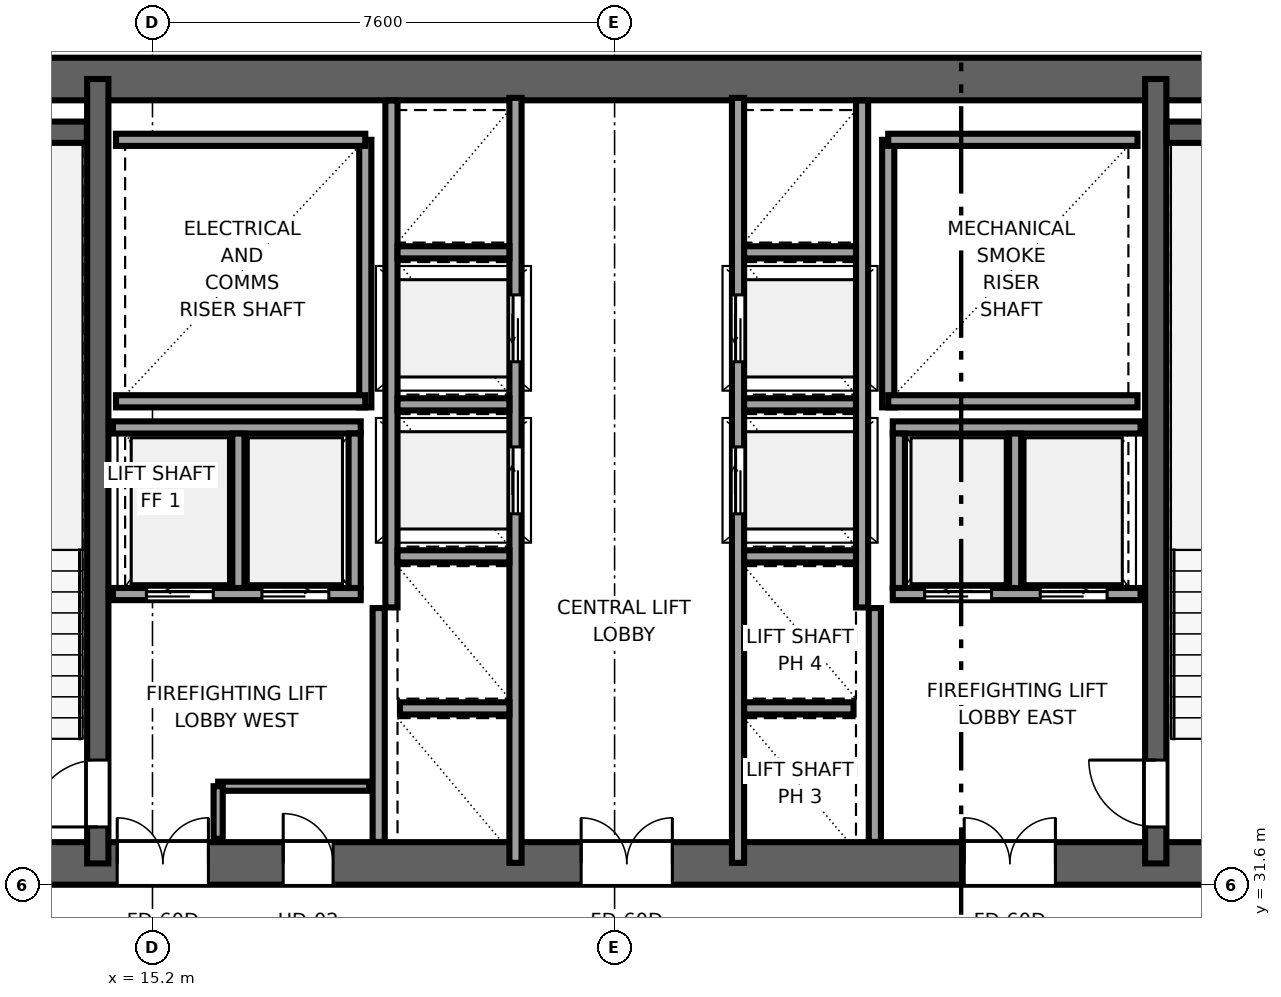
"""IFC4 building model, lengths in metres.
Left out: names, types, materials, properties, quantities, classifications, styles, units other than length and angle.
Written with IfcOpenShell. Run it as: python <this file> out.ifc"""

import sys

from ifc_helpers import new_model, si_unit, direction, frame, frame_2d, origin, place, context, subcontext, project, spatial, rectangle, extrude, source, transform, mapped, element, fill, save


model = new_model("IFC4")
c1 = context("Model", 3, precision=1e-05, world=origin(), true_north=direction((0.0, 1.0)))
c2 = subcontext(c1, "Body", "Model", "MODEL_VIEW")
j1 = project(units=[si_unit("LENGTHUNIT", "METRE"), si_unit("PLANEANGLEUNIT", "RADIAN")], contexts=[c1])
p1 = place(None, origin())
s1 = spatial("IfcSite", under=j1, at=p1, CompositionType="ELEMENT")
p2 = place(p1, origin())
s2 = spatial("IfcBuilding", under=s1, at=p2, CompositionType="ELEMENT")
p3 = place(p2, frame((0.0, 0.0, 111.55)))
s3 = spatial("IfcBuildingStorey", under=s2, at=p3, CompositionType="ELEMENT", Elevation=111.55)
p4 = place(p3, frame((9.8, 31.95, 0.0), z_axis=(0.0, 0.0, 1.0), x_axis=(1.0, 0.0, 0.0)))
e1 = element("IfcWall", 1, at=p4, inside=s3, PredefinedType="SHEAR", context=c2, shape_type="SweptSolid", body=[
    extrude(rectangle(XDim=26.4, YDim=0.7, at=frame_2d((13.2, 0.0))), origin(), (0.0, 0.0, 1.0), 3.55),
])
p5 = place(p4, frame((6.32, 0.0, 0.0), z_axis=(0.0, 0.0, 1.0), x_axis=(-1.0, 0.0, 0.0)))
e2 = element("IfcOpeningElement", 2, at=p5, cuts=e1, PredefinedType="OPENING", context=c2, shape_type="SweptSolid", body=[
    extrude(rectangle(XDim=1.5, YDim=2.04, at=frame_2d((0.75, 1.02))), frame((0.0, 0.36, 0.0), z_axis=(0.0, -1.0, 0.0), x_axis=(1.0, 0.0, 0.0)), (0.0, 0.0, 1.0), 0.72),
])
p6 = place(p4, frame((13.95, 0.0, 0.0), z_axis=(0.0, 0.0, 1.0), x_axis=(-1.0, 0.0, 0.0)))
e3 = element("IfcOpeningElement", 3, at=p6, cuts=e1, PredefinedType="OPENING", context=c2, shape_type="SweptSolid", body=[
    extrude(rectangle(XDim=1.5, YDim=2.04, at=frame_2d((0.75, 1.02))), frame((0.0, 0.36, 0.0), z_axis=(0.0, -1.0, 0.0), x_axis=(1.0, 0.0, 0.0)), (0.0, 0.0, 1.0), 0.72),
])
p7 = place(p4, frame((20.25, 0.0, 0.0), z_axis=(0.0, 0.0, 1.0), x_axis=(-1.0, 0.0, 0.0)))
e4 = element("IfcOpeningElement", 4, at=p7, cuts=e1, PredefinedType="OPENING", context=c2, shape_type="SweptSolid", body=[
    extrude(rectangle(XDim=1.5, YDim=2.04, at=frame_2d((0.75, 1.02))), frame((0.0, 0.36, 0.0), z_axis=(0.0, -1.0, 0.0), x_axis=(1.0, 0.0, 0.0)), (0.0, 0.0, 1.0), 0.72),
])
p8 = place(p4, frame((8.37, 0.0, 0.0), z_axis=(0.0, 0.0, 1.0), x_axis=(-1.0, 0.0, 0.0)))
e5 = element("IfcOpeningElement", 5, at=p8, cuts=e1, PredefinedType="OPENING", context=c2, shape_type="SweptSolid", body=[
    extrude(rectangle(XDim=0.82, YDim=2.01, at=frame_2d((0.41, 1.005))), frame((0.0, 0.36, 0.0), z_axis=(0.0, -1.0, 0.0), x_axis=(1.0, 0.0, 0.0)), (0.0, 0.0, 1.0), 0.72),
])
p9 = place(p3, frame((9.8, 44.85, 0.0), z_axis=(0.0, 0.0, 1.0), x_axis=(1.0, 0.0, 0.0)))
e6 = element("IfcWall", 6, at=p9, inside=s3, PredefinedType="SHEAR", context=c2, shape_type="SweptSolid", body=[
    extrude(rectangle(XDim=26.4, YDim=0.7, at=frame_2d((13.2, 0.0))), origin(), (0.0, 0.0, 1.0), 3.55),
])
p10 = place(p3, frame((14.3, 31.95, 0.0), z_axis=(0.0, 0.0, 1.0), x_axis=(0.0, 1.0, 0.0)))
e7 = element("IfcWall", 7, at=p10, inside=s3, PredefinedType="SHEAR", context=c2, shape_type="SweptSolid", body=[
    extrude(rectangle(XDim=12.9, YDim=0.35, at=frame_2d((6.45, 0.0))), origin(), (0.0, 0.0, 1.0), 3.55),
])
p11 = place(p10, frame((0.6, 0.0, 0.0)))
e8 = element("IfcOpeningElement", 8, at=p11, cuts=e7, PredefinedType="OPENING", context=c2, shape_type="SweptSolid", body=[
    extrude(rectangle(XDim=1.1, YDim=2.12, at=frame_2d((0.55, 1.06))), frame((0.0, 0.185, 0.0), z_axis=(0.0, -1.0, 0.0), x_axis=(1.0, 0.0, 0.0)), (0.0, 0.0, 1.0), 0.37),
])
p12 = place(p3, frame((31.7, 31.95, 0.0), z_axis=(0.0, 0.0, 1.0), x_axis=(0.0, 1.0, 0.0)))
e9 = element("IfcWall", 9, at=p12, inside=s3, PredefinedType="SHEAR", context=c2, shape_type="SweptSolid", body=[
    extrude(rectangle(XDim=12.9, YDim=0.35, at=frame_2d((6.45, 0.0))), origin(), (0.0, 0.0, 1.0), 3.55),
])
p13 = place(p12, frame((1.7, 0.0, 0.0), z_axis=(0.0, 0.0, 1.0), x_axis=(-1.0, 0.0, 0.0)))
e10 = element("IfcOpeningElement", 10, at=p13, cuts=e9, PredefinedType="OPENING", context=c2, shape_type="SweptSolid", body=[
    extrude(rectangle(XDim=1.1, YDim=2.12, at=frame_2d((0.55, 1.06))), frame((0.0, 0.185, 0.0), z_axis=(0.0, -1.0, 0.0), x_axis=(1.0, 0.0, 0.0)), (0.0, 0.0, 1.0), 0.37),
])
for number, where, z_axis, x_axis in (
    (11, (10.52, 43.975, 0.0), (0.0, 0.0, 1.0), (1.0, 0.0, 0.0)),
    (12, (31.88, 43.975, 0.0), (0.0, 0.0, 1.0), (1.0, 0.0, 0.0)),
):
    element("IfcWall", number, at=place(p3, frame(where, z_axis=z_axis, x_axis=x_axis)), inside=s3, PredefinedType="SHEAR", context=c2, shape_type="SweptSolid", body=[
        extrude(rectangle(XDim=3.6, YDim=0.35, at=frame_2d((1.8, 0.0))), origin(), (0.0, 0.0, 1.0), 3.55),
    ])
p14 = place(p3, frame((18.7, 39.45, 0.0), z_axis=(0.0, 0.0, 1.0), x_axis=(0.0, 1.0, 0.0)))
e13 = element("IfcWall", 13, at=p14, inside=s3, PredefinedType="SOLIDWALL", context=c2, shape_type="SweptSolid", body=[
    extrude(rectangle(XDim=4.4, YDim=0.2, at=frame_2d((2.2, 0.0))), origin(), (0.0, 0.0, 1.0), 3.37),
])
for number, where, z_axis, x_axis in (
    (14, (14.6, 39.55, 0.0), (0.0, 0.0, 1.0), (1.0, 0.0, 0.0)),
    (15, (14.6, 43.85, 0.0), (0.0, 0.0, 1.0), (1.0, 0.0, 0.0)),
):
    element("IfcWall", number, at=place(p3, frame(where, z_axis=z_axis, x_axis=x_axis)), inside=s3, PredefinedType="SOLIDWALL", context=c2, shape_type="SweptSolid", body=[
        extrude(rectangle(XDim=4.1, YDim=0.2, at=frame_2d((2.05, 0.0))), origin(), (0.0, 0.0, 1.0), 3.37),
    ])
p15 = place(p3, frame((27.3, 39.45, 0.0), z_axis=(0.0, 0.0, 1.0), x_axis=(0.0, 1.0, 0.0)))
e16 = element("IfcWall", 16, at=p15, inside=s3, PredefinedType="SOLIDWALL", context=c2, shape_type="SweptSolid", body=[
    extrude(rectangle(XDim=4.4, YDim=0.2, at=frame_2d((2.2, 0.0))), origin(), (0.0, 0.0, 1.0), 3.37),
])
for number, where, z_axis, x_axis in (
    (17, (27.3, 39.55, 0.0), (0.0, 0.0, 1.0), (1.0, 0.0, 0.0)),
    (18, (27.3, 43.85, 0.0), (0.0, 0.0, 1.0), (1.0, 0.0, 0.0)),
):
    element("IfcWall", number, at=place(p3, frame(where, z_axis=z_axis, x_axis=x_axis)), inside=s3, PredefinedType="SOLIDWALL", context=c2, shape_type="SweptSolid", body=[
        extrude(rectangle(XDim=4.1, YDim=0.2, at=frame_2d((2.05, 0.0))), origin(), (0.0, 0.0, 1.0), 3.37),
    ])
for number, where, z_axis, x_axis in (
    (19, (18.92, 32.304, 0.0), (0.0, 0.0, 1.0), (0.0, 1.0, 0.0)),
    (20, (27.08, 32.304, 0.0), (0.0, 0.0, 1.0), (0.0, 1.0, 0.0)),
):
    element("IfcWall", number, at=place(p3, frame(where, z_axis=z_axis, x_axis=x_axis)), inside=s3, PredefinedType="SOLIDWALL", context=c2, shape_type="SweptSolid", body=[
        extrude(rectangle(XDim=3.846, YDim=0.2, at=frame_2d((1.923, 0.0))), origin(), (0.0, 0.0, 1.0), 3.37),
    ])
p16 = place(p3, frame((21.17, 31.96, 0.0), z_axis=(0.0, 0.0, 1.0), x_axis=(0.0, 1.0, 0.0)))
e21 = element("IfcWall", 21, at=p16, inside=s3, PredefinedType="SOLIDWALL", context=c2, shape_type="SweptSolid", body=[
    extrude(rectangle(XDim=12.58, YDim=0.2, at=frame_2d((6.29, 0.0))), origin(), (0.0, 0.0, 1.0), 3.37),
])
p17 = place(p16, frame((5.74, 0.0, 0.0)))
e22 = element("IfcOpeningElement", 22, at=p17, cuts=e21, PredefinedType="OPENING", context=c2, shape_type="SweptSolid", body=[
    extrude(rectangle(XDim=1.1, YDim=2.12, at=frame_2d((0.55, 1.06))), frame((0.0, 0.11, 0.0), z_axis=(0.0, -1.0, 0.0), x_axis=(1.0, 0.0, 0.0)), (0.0, 0.0, 1.0), 0.22),
])
p18 = place(p16, frame((8.24, 0.0, 0.0)))
e23 = element("IfcOpeningElement", 23, at=p18, cuts=e21, PredefinedType="OPENING", context=c2, shape_type="SweptSolid", body=[
    extrude(rectangle(XDim=1.1, YDim=2.12, at=frame_2d((0.55, 1.06))), frame((0.0, 0.11, 0.0), z_axis=(0.0, -1.0, 0.0), x_axis=(1.0, 0.0, 0.0)), (0.0, 0.0, 1.0), 0.22),
])
p19 = place(p3, frame((19.13, 36.16, 0.0), z_axis=(0.0, 0.0, 1.0), x_axis=(0.0, 1.0, 0.0)))
e24 = element("IfcWall", 24, at=p19, inside=s3, PredefinedType="SOLIDWALL", context=c2, shape_type="SweptSolid", body=[
    extrude(rectangle(XDim=8.336, YDim=0.2, at=frame_2d((4.168, 0.0))), origin(), (0.0, 0.0, 1.0), 3.37),
])
p20 = place(p3, frame((19.27, 34.5, 0.0), z_axis=(0.0, 0.0, 1.0), x_axis=(1.0, 0.0, 0.0)))
e25 = element("IfcWall", 25, at=p20, inside=s3, PredefinedType="SOLIDWALL", context=c2, shape_type="SweptSolid", body=[
    extrude(rectangle(XDim=1.8, YDim=0.2, at=frame_2d((0.9, 0.0))), origin(), (0.0, 0.0, 1.0), 3.37),
])
for number, where, z_axis, x_axis in (
    (26, (19.23, 37.0, 0.0), (0.0, 0.0, 1.0), (1.0, 0.0, 0.0)),
    (27, (19.23, 39.5, 0.0), (0.0, 0.0, 1.0), (1.0, 0.0, 0.0)),
    (28, (19.23, 42.0, 0.0), (0.0, 0.0, 1.0), (1.0, 0.0, 0.0)),
):
    element("IfcWall", number, at=place(p3, frame(where, z_axis=z_axis, x_axis=x_axis)), inside=s3, PredefinedType="SOLIDWALL", context=c2, shape_type="SweptSolid", body=[
        extrude(rectangle(XDim=1.84, YDim=0.2, at=frame_2d((0.92, 0.0))), origin(), (0.0, 0.0, 1.0), 3.37),
    ])
p21 = place(p3, frame((27.375, 36.38, 0.0), z_axis=(0.0, 0.0, 1.0), x_axis=(1.0, 0.0, 0.0)))
e29 = element("IfcWall", 29, at=p21, inside=s3, PredefinedType="SOLIDWALL", context=c2, shape_type="SweptSolid", body=[
    extrude(rectangle(XDim=4.075, YDim=0.2, at=frame_2d((2.038, 0.0))), origin(), (0.0, 0.0, 1.0), 3.37),
])
p22 = place(p21, frame((0.525, 0.0, 0.0)))
e30 = element("IfcOpeningElement", 30, at=p22, cuts=e29, PredefinedType="OPENING", context=c2, shape_type="SweptSolid", body=[
    extrude(rectangle(XDim=1.1, YDim=2.12, at=frame_2d((0.55, 1.06))), frame((0.0, 0.11, 0.0), z_axis=(0.0, -1.0, 0.0), x_axis=(1.0, 0.0, 0.0)), (0.0, 0.0, 1.0), 0.22),
])
p23 = place(p21, frame((2.425, 0.0, 0.0)))
e31 = element("IfcOpeningElement", 31, at=p23, cuts=e29, PredefinedType="OPENING", context=c2, shape_type="SweptSolid", body=[
    extrude(rectangle(XDim=1.1, YDim=2.12, at=frame_2d((0.55, 1.06))), frame((0.0, 0.11, 0.0), z_axis=(0.0, -1.0, 0.0), x_axis=(1.0, 0.0, 0.0)), (0.0, 0.0, 1.0), 0.22),
])
p24 = place(p3, frame((27.375, 39.12, 0.0), z_axis=(0.0, 0.0, 1.0), x_axis=(1.0, 0.0, 0.0)))
e32 = element("IfcWall", 32, at=p24, inside=s3, PredefinedType="SOLIDWALL", context=c2, shape_type="SweptSolid", body=[
    extrude(rectangle(XDim=4.075, YDim=0.2, at=frame_2d((2.038, 0.0))), origin(), (0.0, 0.0, 1.0), 3.37),
])
for number, where, z_axis, x_axis in (
    (33, (27.475, 36.48, 0.0), (0.0, 0.0, 1.0), (0.0, 1.0, 0.0)),
    (34, (29.387, 36.48, 0.0), (0.0, 0.0, 1.0), (0.0, 1.0, 0.0)),
):
    element("IfcWall", number, at=place(p3, frame(where, z_axis=z_axis, x_axis=x_axis)), inside=s3, PredefinedType="SOLIDWALL", context=c2, shape_type="SweptSolid", body=[
        extrude(rectangle(XDim=2.54, YDim=0.2, at=frame_2d((1.27, 0.0))), origin(), (0.0, 0.0, 1.0), 3.37),
    ])
p25 = place(p3, frame((14.55, 36.38, 0.0), z_axis=(0.0, 0.0, 1.0), x_axis=(1.0, 0.0, 0.0)))
e35 = element("IfcWall", 35, at=p25, inside=s3, PredefinedType="SOLIDWALL", context=c2, shape_type="SweptSolid", body=[
    extrude(rectangle(XDim=4.075, YDim=0.2, at=frame_2d((2.038, 0.0))), origin(), (0.0, 0.0, 1.0), 3.37),
])
p26 = place(p25, frame((0.55, 0.0, 0.0)))
e36 = element("IfcOpeningElement", 36, at=p26, cuts=e35, PredefinedType="OPENING", context=c2, shape_type="SweptSolid", body=[
    extrude(rectangle(XDim=1.1, YDim=2.12, at=frame_2d((0.55, 1.06))), frame((0.0, 0.11, 0.0), z_axis=(0.0, -1.0, 0.0), x_axis=(1.0, 0.0, 0.0)), (0.0, 0.0, 1.0), 0.22),
])
p27 = place(p25, frame((2.45, 0.0, 0.0)))
e37 = element("IfcOpeningElement", 37, at=p27, cuts=e35, PredefinedType="OPENING", context=c2, shape_type="SweptSolid", body=[
    extrude(rectangle(XDim=1.1, YDim=2.12, at=frame_2d((0.55, 1.06))), frame((0.0, 0.11, 0.0), z_axis=(0.0, -1.0, 0.0), x_axis=(1.0, 0.0, 0.0)), (0.0, 0.0, 1.0), 0.22),
])
p28 = place(p3, frame((14.55, 39.12, 0.0), z_axis=(0.0, 0.0, 1.0), x_axis=(1.0, 0.0, 0.0)))
e38 = element("IfcWall", 38, at=p28, inside=s3, PredefinedType="SOLIDWALL", context=c2, shape_type="SweptSolid", body=[
    extrude(rectangle(XDim=4.075, YDim=0.2, at=frame_2d((2.038, 0.0))), origin(), (0.0, 0.0, 1.0), 3.37),
])
for number, where, z_axis, x_axis in (
    (39, (18.525, 36.48, 0.0), (0.0, 0.0, 1.0), (0.0, 1.0, 0.0)),
    (40, (16.613, 36.48, 0.0), (0.0, 0.0, 1.0), (0.0, 1.0, 0.0)),
):
    element("IfcWall", number, at=place(p3, frame(where, z_axis=z_axis, x_axis=x_axis)), inside=s3, PredefinedType="SOLIDWALL", context=c2, shape_type="SweptSolid", body=[
        extrude(rectangle(XDim=2.54, YDim=0.2, at=frame_2d((1.27, 0.0))), origin(), (0.0, 0.0, 1.0), 3.37),
    ])
p29 = place(p3, frame((24.83, 31.96, 0.0), z_axis=(0.0, 0.0, 1.0), x_axis=(0.0, 1.0, 0.0)))
e41 = element("IfcWall", 41, at=p29, inside=s3, PredefinedType="SOLIDWALL", context=c2, shape_type="SweptSolid", body=[
    extrude(rectangle(XDim=12.58, YDim=0.2, at=frame_2d((6.29, 0.0))), origin(), (0.0, 0.0, 1.0), 3.37),
])
p30 = place(p29, frame((5.74, 0.0, 0.0)))
e42 = element("IfcOpeningElement", 42, at=p30, cuts=e41, PredefinedType="OPENING", context=c2, shape_type="SweptSolid", body=[
    extrude(rectangle(XDim=1.1, YDim=2.12, at=frame_2d((0.55, 1.06))), frame((0.0, 0.11, 0.0), z_axis=(0.0, -1.0, 0.0), x_axis=(1.0, 0.0, 0.0)), (0.0, 0.0, 1.0), 0.22),
])
p31 = place(p29, frame((8.24, 0.0, 0.0)))
e43 = element("IfcOpeningElement", 43, at=p31, cuts=e41, PredefinedType="OPENING", context=c2, shape_type="SweptSolid", body=[
    extrude(rectangle(XDim=1.1, YDim=2.12, at=frame_2d((0.55, 1.06))), frame((0.0, 0.11, 0.0), z_axis=(0.0, -1.0, 0.0), x_axis=(1.0, 0.0, 0.0)), (0.0, 0.0, 1.0), 0.22),
])
p32 = place(p3, frame((26.87, 36.16, 0.0), z_axis=(0.0, 0.0, 1.0), x_axis=(0.0, 1.0, 0.0)))
e44 = element("IfcWall", 44, at=p32, inside=s3, PredefinedType="SOLIDWALL", context=c2, shape_type="SweptSolid", body=[
    extrude(rectangle(XDim=8.336, YDim=0.2, at=frame_2d((4.168, 0.0))), origin(), (0.0, 0.0, 1.0), 3.37),
])
p33 = place(p3, frame((24.93, 34.5, 0.0), z_axis=(0.0, 0.0, 1.0), x_axis=(1.0, 0.0, 0.0)))
e45 = element("IfcWall", 45, at=p33, inside=s3, PredefinedType="SOLIDWALL", context=c2, shape_type="SweptSolid", body=[
    extrude(rectangle(XDim=1.8, YDim=0.2, at=frame_2d((0.9, 0.0))), origin(), (0.0, 0.0, 1.0), 3.37),
])
for number, where, z_axis, x_axis in (
    (46, (24.93, 37.0, 0.0), (0.0, 0.0, 1.0), (1.0, 0.0, 0.0)),
    (47, (24.93, 39.5, 0.0), (0.0, 0.0, 1.0), (1.0, 0.0, 0.0)),
    (48, (24.93, 42.0, 0.0), (0.0, 0.0, 1.0), (1.0, 0.0, 0.0)),
):
    element("IfcWall", number, at=place(p3, frame(where, z_axis=z_axis, x_axis=x_axis)), inside=s3, PredefinedType="SOLIDWALL", context=c2, shape_type="SweptSolid", body=[
        extrude(rectangle(XDim=1.84, YDim=0.2, at=frame_2d((0.92, 0.0))), origin(), (0.0, 0.0, 1.0), 3.37),
    ])
p34 = place(p3, frame((16.28, 33.22, 0.0), z_axis=(0.0, 0.0, 1.0), x_axis=(1.0, 0.0, 0.0)))
e49 = element("IfcWall", 49, at=p34, inside=s3, PredefinedType="PARTITIONING", context=c2, shape_type="SweptSolid", body=[
    extrude(rectangle(XDim=2.485, YDim=0.15, at=frame_2d((1.242, 0.0))), origin(), (0.0, 0.0, 1.0), 3.37),
])
p35 = place(p3, frame((16.28, 32.355, 0.0), z_axis=(0.0, 0.0, 1.0), x_axis=(0.0, 1.0, 0.0)))
e50 = element("IfcWall", 50, at=p35, inside=s3, PredefinedType="PARTITIONING", context=c2, shape_type="SweptSolid", body=[
    extrude(rectangle(XDim=0.865, YDim=0.15, at=frame_2d((0.433, 0.0))), origin(), (0.0, 0.0, 1.0), 3.37),
])
m1 = source(origin(), c2, "Body", "SweptSolid", [
    extrude(rectangle(XDim=1.1, YDim=2.12, at=frame_2d((0.55, 1.06))), frame((0.0, 0.025, 0.0), z_axis=(0.0, -1.0, 0.0), x_axis=(1.0, 0.0, 0.0)), (0.0, 0.0, 1.0), 0.05),
])
p36 = place(p11, origin())
e51 = element("IfcDoor", 51, at=p36, inside=s3, OperationType="SINGLE_SWING_LEFT", PredefinedType="DOOR", context=c2, shape_type="MappedRepresentation", body=[
    mapped(m1, transform((0.0, 0.0, 0.0), x_axis=(1.0, 0.0, 0.0), y_axis=(0.0, 1.0, 0.0), z_axis=(0.0, 0.0, 1.0), scale=1.0)),
])
fill(e8, e51)
p37 = place(p13, origin())
e52 = element("IfcDoor", 52, at=p37, inside=s3, OperationType="SINGLE_SWING_RIGHT", PredefinedType="DOOR", context=c2, shape_type="MappedRepresentation", body=[
    mapped(m1, transform((0.0, 0.0, 0.0), x_axis=(1.0, 0.0, 0.0), y_axis=(0.0, 1.0, 0.0), z_axis=(0.0, 0.0, 1.0), scale=1.0)),
])
fill(e10, e52)
m2 = source(origin(), c2, "Body", "SweptSolid", [
    extrude(rectangle(XDim=1.5, YDim=2.04, at=frame_2d((0.75, 1.02))), frame((0.0, 0.025, 0.0), z_axis=(0.0, -1.0, 0.0), x_axis=(1.0, 0.0, 0.0)), (0.0, 0.0, 1.0), 0.05),
])
p38 = place(p5, origin())
e53 = element("IfcDoor", 53, at=p38, inside=s3, OperationType="DOUBLE_DOOR_SINGLE_SWING", PredefinedType="DOOR", context=c2, shape_type="MappedRepresentation", body=[
    mapped(m2, transform((0.0, 0.0, 0.0), x_axis=(1.0, 0.0, 0.0), y_axis=(0.0, 1.0, 0.0), z_axis=(0.0, 0.0, 1.0), scale=1.0)),
])
fill(e2, e53)
p39 = place(p6, origin())
e54 = element("IfcDoor", 54, at=p39, inside=s3, OperationType="DOUBLE_DOOR_SINGLE_SWING", PredefinedType="DOOR", context=c2, shape_type="MappedRepresentation", body=[
    mapped(m2, transform((0.0, 0.0, 0.0), x_axis=(1.0, 0.0, 0.0), y_axis=(0.0, 1.0, 0.0), z_axis=(0.0, 0.0, 1.0), scale=1.0)),
])
fill(e3, e54)
p40 = place(p7, origin())
e55 = element("IfcDoor", 55, at=p40, inside=s3, OperationType="DOUBLE_DOOR_SINGLE_SWING", PredefinedType="DOOR", context=c2, shape_type="MappedRepresentation", body=[
    mapped(m2, transform((0.0, 0.0, 0.0), x_axis=(1.0, 0.0, 0.0), y_axis=(0.0, 1.0, 0.0), z_axis=(0.0, 0.0, 1.0), scale=1.0)),
])
fill(e4, e55)
m3 = source(origin(), c2, "Body", "SweptSolid", [
    extrude(rectangle(XDim=0.82, YDim=2.01, at=frame_2d((0.41, 1.005))), frame((0.0, 0.025, 0.0), z_axis=(0.0, -1.0, 0.0), x_axis=(1.0, 0.0, 0.0)), (0.0, 0.0, 1.0), 0.05),
])
p41 = place(p8, origin())
e56 = element("IfcDoor", 56, at=p41, inside=s3, OperationType="SINGLE_SWING_LEFT", PredefinedType="DOOR", context=c2, shape_type="MappedRepresentation", body=[
    mapped(m3, transform((0.0, 0.0, 0.0), x_axis=(1.0, 0.0, 0.0), y_axis=(0.0, 1.0, 0.0), z_axis=(0.0, 0.0, 1.0), scale=1.0)),
])
fill(e5, e56)
m4 = source(origin(), c2, "Body", "SweptSolid", [
    extrude(rectangle(XDim=1.1, YDim=2.12, at=frame_2d((0.55, 1.06))), frame((0.0, 0.025, 0.0), z_axis=(0.0, -1.0, 0.0), x_axis=(1.0, 0.0, 0.0)), (0.0, 0.0, 1.0), 0.05),
])
p42 = place(p17, origin())
e57 = element("IfcDoor", 57, at=p42, inside=s3, OperationType="SLIDING_TO_RIGHT", PredefinedType="DOOR", context=c2, shape_type="MappedRepresentation", body=[
    mapped(m4, transform((0.0, 0.0, 0.0), x_axis=(1.0, 0.0, 0.0), y_axis=(0.0, 1.0, 0.0), z_axis=(0.0, 0.0, 1.0), scale=1.0)),
])
fill(e22, e57)
p43 = place(p18, origin())
e58 = element("IfcDoor", 58, at=p43, inside=s3, OperationType="SLIDING_TO_LEFT", PredefinedType="DOOR", context=c2, shape_type="MappedRepresentation", body=[
    mapped(m4, transform((0.0, 0.0, 0.0), x_axis=(1.0, 0.0, 0.0), y_axis=(0.0, 1.0, 0.0), z_axis=(0.0, 0.0, 1.0), scale=1.0)),
])
fill(e23, e58)
p44 = place(p22, origin())
e59 = element("IfcDoor", 59, at=p44, inside=s3, OperationType="SLIDING_TO_LEFT", PredefinedType="DOOR", context=c2, shape_type="MappedRepresentation", body=[
    mapped(m4, transform((0.0, 0.0, 0.0), x_axis=(1.0, 0.0, 0.0), y_axis=(0.0, 1.0, 0.0), z_axis=(0.0, 0.0, 1.0), scale=1.0)),
])
fill(e30, e59)
p45 = place(p23, origin())
e60 = element("IfcDoor", 60, at=p45, inside=s3, OperationType="SLIDING_TO_RIGHT", PredefinedType="DOOR", context=c2, shape_type="MappedRepresentation", body=[
    mapped(m4, transform((0.0, 0.0, 0.0), x_axis=(1.0, 0.0, 0.0), y_axis=(0.0, 1.0, 0.0), z_axis=(0.0, 0.0, 1.0), scale=1.0)),
])
fill(e31, e60)
p46 = place(p26, origin())
e61 = element("IfcDoor", 61, at=p46, inside=s3, OperationType="SLIDING_TO_LEFT", PredefinedType="DOOR", context=c2, shape_type="MappedRepresentation", body=[
    mapped(m4, transform((0.0, 0.0, 0.0), x_axis=(1.0, 0.0, 0.0), y_axis=(0.0, 1.0, 0.0), z_axis=(0.0, 0.0, 1.0), scale=1.0)),
])
fill(e36, e61)
p47 = place(p27, origin())
e62 = element("IfcDoor", 62, at=p47, inside=s3, OperationType="SLIDING_TO_RIGHT", PredefinedType="DOOR", context=c2, shape_type="MappedRepresentation", body=[
    mapped(m4, transform((0.0, 0.0, 0.0), x_axis=(1.0, 0.0, 0.0), y_axis=(0.0, 1.0, 0.0), z_axis=(0.0, 0.0, 1.0), scale=1.0)),
])
fill(e37, e62)
p48 = place(p30, origin())
e63 = element("IfcDoor", 63, at=p48, inside=s3, OperationType="SLIDING_TO_RIGHT", PredefinedType="DOOR", context=c2, shape_type="MappedRepresentation", body=[
    mapped(m4, transform((0.0, 0.0, 0.0), x_axis=(1.0, 0.0, 0.0), y_axis=(0.0, 1.0, 0.0), z_axis=(0.0, 0.0, 1.0), scale=1.0)),
])
fill(e42, e63)
p49 = place(p31, origin())
e64 = element("IfcDoor", 64, at=p49, inside=s3, OperationType="SLIDING_TO_LEFT", PredefinedType="DOOR", context=c2, shape_type="MappedRepresentation", body=[
    mapped(m4, transform((0.0, 0.0, 0.0), x_axis=(1.0, 0.0, 0.0), y_axis=(0.0, 1.0, 0.0), z_axis=(0.0, 0.0, 1.0), scale=1.0)),
])
fill(e43, e64)
save(model, sys.argv[1])
